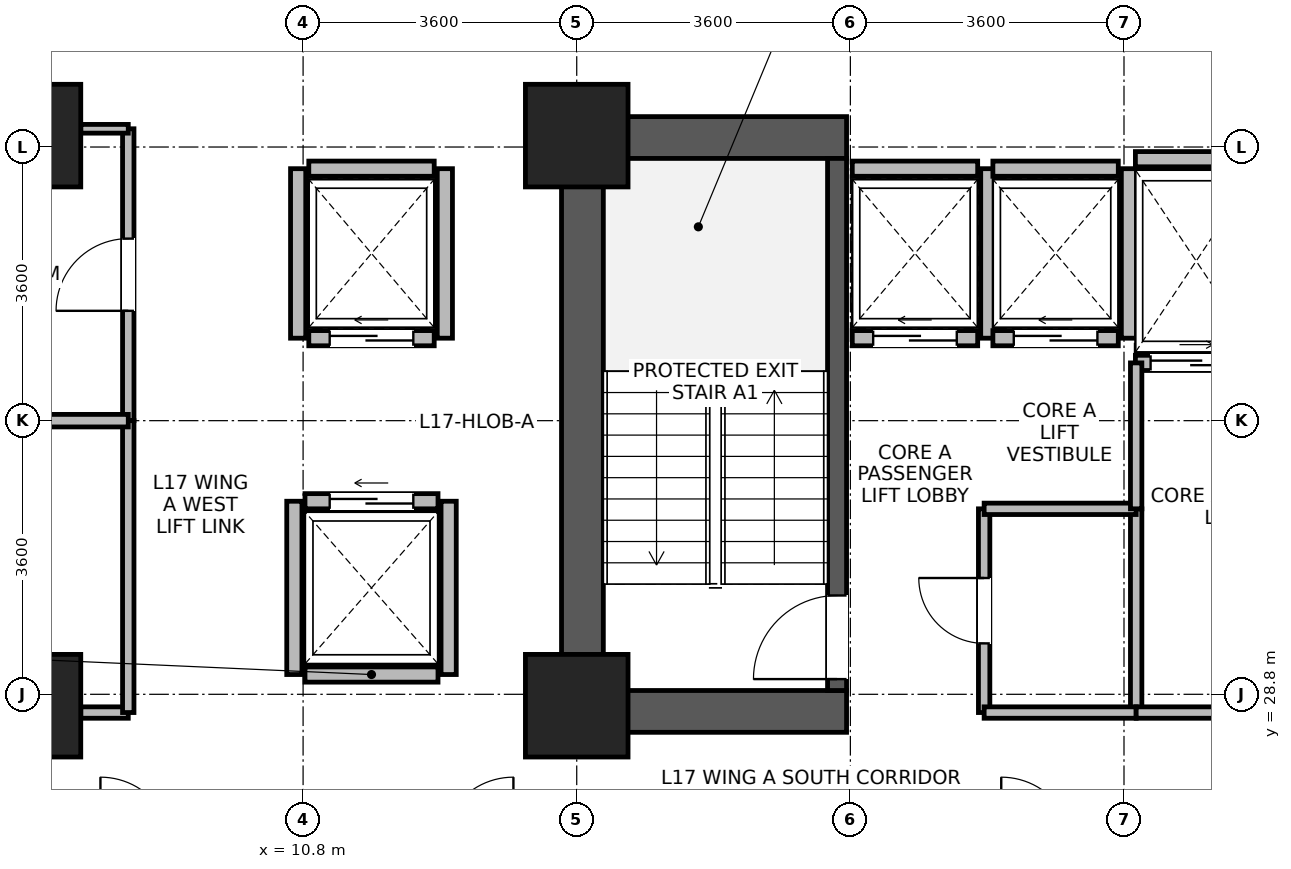
"""IFC4 building model, lengths in metres.
Left out: names, types, materials, properties, quantities, classifications, styles, units other than length and angle.
Written with IfcOpenShell. Run it as: python <this file> out.ifc"""

import sys

from ifc_helpers import new_model, si_unit, direction, frame, frame_2d, origin, origin_2d, place, context, subcontext, project, spatial, rectangle, extrude, source, transform, mapped, element, fill, save


model = new_model("IFC4")
c1 = context("Model", 3, precision=1e-05, world=origin(), true_north=direction((0.0, 1.0)))
c2 = subcontext(c1, "Body", "Model", "MODEL_VIEW")
j1 = project(units=[si_unit("LENGTHUNIT", "METRE"), si_unit("PLANEANGLEUNIT", "RADIAN")], contexts=[c1])
p1 = place(None, origin())
s1 = spatial("IfcSite", under=j1, at=p1, CompositionType="ELEMENT")
p2 = place(p1, origin())
s2 = spatial("IfcBuilding", under=s1, at=p2, CompositionType="ELEMENT")
p3 = place(p2, frame((0.0, 0.0, 69.7)))
s3 = spatial("IfcBuildingStorey", under=s2, at=p3, CompositionType="ELEMENT", Elevation=69.7)
p4 = place(p3, frame((14.475, 28.3, 0.0), z_axis=(0.0, 0.0, 1.0), x_axis=(0.0, 1.0, 0.0)))
e1 = element("IfcWall", 1, at=p4, inside=s3, PredefinedType="SHEAR", context=c2, shape_type="SweptSolid", body=[
    extrude(rectangle(XDim=8.1, YDim=0.55, at=frame_2d((4.05, 0.0))), origin(), (0.0, 0.0, 1.0), 3.34),
])
for number, where, z_axis, x_axis in (
    (2, (14.75, 28.575, 0.0), (0.0, 0.0, 1.0), (1.0, 0.0, 0.0)),
    (3, (14.75, 36.125, 0.0), (0.0, 0.0, 1.0), (1.0, 0.0, 0.0)),
):
    element("IfcWall", number, at=place(p3, frame(where, z_axis=z_axis, x_axis=x_axis)), inside=s3, PredefinedType="SHEAR", context=c2, shape_type="SweptSolid", body=[
        extrude(rectangle(XDim=3.2, YDim=0.55, at=frame_2d((1.6, 0.0))), origin(), (0.0, 0.0, 1.0), 3.34),
    ])
p5 = place(p3, frame((17.825, 28.85, 0.0), z_axis=(0.0, 0.0, 1.0), x_axis=(0.0, 1.0, 0.0)))
e4 = element("IfcWall", 4, at=p5, inside=s3, PredefinedType="SHEAR", context=c2, shape_type="SweptSolid", body=[
    extrude(rectangle(XDim=7.0, YDim=0.25, at=frame_2d((3.5, 0.0))), origin(), (0.0, 0.0, 1.0), 3.34),
])
p6 = place(p5, frame((0.15, 0.0, 0.0)))
e5 = element("IfcOpeningElement", 5, at=p6, cuts=e4, PredefinedType="OPENING", context=c2, shape_type="SweptSolid", body=[
    extrude(rectangle(XDim=1.1, YDim=2.08, at=frame_2d((0.55, 1.04))), frame((0.0, 0.135, 0.0), z_axis=(0.0, -1.0, 0.0), x_axis=(1.0, 0.0, 0.0)), (0.0, 0.0, 1.0), 0.27),
])
m1 = source(origin(), c2, "Body", "SweptSolid", [
    extrude(rectangle(XDim=1.35, YDim=1.35, at=origin_2d()), origin(), (0.0, 0.0, 1.0), 3.7),
])
for number, where, z_axis, x_axis in (
    (6, (7.2, 28.65, 0.0), (0.0, 0.0, 1.0), (1.0, 0.0, 0.0)),
    (7, (7.2, 36.15, 0.0), (0.0, 0.0, 1.0), (1.0, 0.0, 0.0)),
    (8, (14.4, 28.65, 0.0), (0.0, 0.0, 1.0), (1.0, 0.0, 0.0)),
    (9, (14.4, 36.15, 0.0), (0.0, 0.0, 1.0), (1.0, 0.0, 0.0)),
):
    element("IfcColumn", number, at=place(p3, frame(where, z_axis=z_axis, x_axis=x_axis)), inside=s3, PredefinedType="COLUMN", context=c2, shape_type="MappedRepresentation", body=[
        mapped(m1, transform((0.0, 0.0, 0.0), x_axis=(1.0, 0.0, 0.0), y_axis=(0.0, 1.0, 0.0), z_axis=(0.0, 0.0, 1.0), scale=1.0)),
    ])
p7 = place(p3, frame((18.025, 33.485, 0.0), z_axis=(0.0, 0.0, 1.0), x_axis=(1.0, 0.0, 0.0)))
e10 = element("IfcWall", 10, at=p7, inside=s3, PredefinedType="PARTITIONING", context=c2, shape_type="SweptSolid", body=[
    extrude(rectangle(XDim=1.65, YDim=0.2, at=frame_2d((0.825, 0.0))), origin(), (0.0, 0.0, 1.0), 3.32),
])
p8 = place(p7, frame((0.275, 0.0, 0.0)))
e11 = element("IfcOpeningElement", 11, at=p8, cuts=e10, PredefinedType="OPENING", context=c2, shape_type="SweptSolid", body=[
    extrude(rectangle(XDim=1.1, YDim=2.12, at=frame_2d((0.55, 1.06))), frame((0.0, 0.11, 0.0), z_axis=(0.0, -1.0, 0.0), x_axis=(1.0, 0.0, 0.0)), (0.0, 0.0, 1.0), 0.22),
])
p9 = place(p3, frame((18.025, 35.715, 0.0), z_axis=(0.0, 0.0, 1.0), x_axis=(1.0, 0.0, 0.0)))
e12 = element("IfcWall", 12, at=p9, inside=s3, PredefinedType="PARTITIONING", context=c2, shape_type="SweptSolid", body=[
    extrude(rectangle(XDim=1.65, YDim=0.2, at=frame_2d((0.825, 0.0))), origin(), (0.0, 0.0, 1.0), 2.12),
])
p10 = place(p3, frame((19.815, 33.485, 0.0), z_axis=(0.0, 0.0, 1.0), x_axis=(0.0, 1.0, 0.0)))
e13 = element("IfcWall", 13, at=p10, inside=s3, PredefinedType="PARTITIONING", context=c2, shape_type="SweptSolid", body=[
    extrude(rectangle(XDim=2.23, YDim=0.2, at=frame_2d((1.115, 0.0))), origin(), (0.0, 0.0, 1.0), 3.32),
])
p11 = place(p3, frame((19.875, 33.485, 0.0), z_axis=(0.0, 0.0, 1.0), x_axis=(1.0, 0.0, 0.0)))
e14 = element("IfcWall", 14, at=p11, inside=s3, PredefinedType="PARTITIONING", context=c2, shape_type="SweptSolid", body=[
    extrude(rectangle(XDim=1.65, YDim=0.2, at=frame_2d((0.825, 0.0))), origin(), (0.0, 0.0, 1.0), 3.32),
])
p12 = place(p11, frame((0.275, 0.0, 0.0)))
e15 = element("IfcOpeningElement", 15, at=p12, cuts=e14, PredefinedType="OPENING", context=c2, shape_type="SweptSolid", body=[
    extrude(rectangle(XDim=1.1, YDim=2.12, at=frame_2d((0.55, 1.06))), frame((0.0, 0.11, 0.0), z_axis=(0.0, -1.0, 0.0), x_axis=(1.0, 0.0, 0.0)), (0.0, 0.0, 1.0), 0.22),
])
p13 = place(p3, frame((19.875, 35.715, 0.0), z_axis=(0.0, 0.0, 1.0), x_axis=(1.0, 0.0, 0.0)))
e16 = element("IfcWall", 16, at=p13, inside=s3, PredefinedType="PARTITIONING", context=c2, shape_type="SweptSolid", body=[
    extrude(rectangle(XDim=1.65, YDim=0.2, at=frame_2d((0.825, 0.0))), origin(), (0.0, 0.0, 1.0), 2.12),
])
p14 = place(p3, frame((21.665, 33.485, 0.0), z_axis=(0.0, 0.0, 1.0), x_axis=(0.0, 1.0, 0.0)))
e17 = element("IfcWall", 17, at=p14, inside=s3, PredefinedType="PARTITIONING", context=c2, shape_type="SweptSolid", body=[
    extrude(rectangle(XDim=2.23, YDim=0.2, at=frame_2d((1.115, 0.0))), origin(), (0.0, 0.0, 1.0), 3.32),
])
p15 = place(p3, frame((10.825, 29.06, 0.0), z_axis=(0.0, 0.0, 1.0), x_axis=(1.0, 0.0, 0.0)))
e18 = element("IfcWall", 18, at=p15, inside=s3, PredefinedType="PARTITIONING", context=c2, shape_type="SweptSolid", body=[
    extrude(rectangle(XDim=1.75, YDim=0.2, at=frame_2d((0.875, 0.0))), origin(), (0.0, 0.0, 1.0), 3.32),
])
p16 = place(p3, frame((10.825, 31.34, 0.0), z_axis=(0.0, 0.0, 1.0), x_axis=(1.0, 0.0, 0.0)))
e19 = element("IfcWall", 19, at=p16, inside=s3, PredefinedType="PARTITIONING", context=c2, shape_type="SweptSolid", body=[
    extrude(rectangle(XDim=1.75, YDim=0.2, at=frame_2d((0.875, 0.0))), origin(), (0.0, 0.0, 1.0), 3.32),
])
p17 = place(p16, frame((0.325, 0.0, 0.0)))
e20 = element("IfcOpeningElement", 20, at=p17, cuts=e19, PredefinedType="OPENING", context=c2, shape_type="SweptSolid", body=[
    extrude(rectangle(XDim=1.1, YDim=2.12, at=frame_2d((0.55, 1.06))), frame((0.0, 0.11, 0.0), z_axis=(0.0, -1.0, 0.0), x_axis=(1.0, 0.0, 0.0)), (0.0, 0.0, 1.0), 0.22),
])
for number, where, z_axis, x_axis in (
    (21, (10.685, 29.06, 0.0), (0.0, 0.0, 1.0), (0.0, 1.0, 0.0)),
    (22, (12.715, 29.06, 0.0), (0.0, 0.0, 1.0), (0.0, 1.0, 0.0)),
):
    element("IfcWall", number, at=place(p3, frame(where, z_axis=z_axis, x_axis=x_axis)), inside=s3, PredefinedType="PARTITIONING", context=c2, shape_type="SweptSolid", body=[
        extrude(rectangle(XDim=2.28, YDim=0.2, at=frame_2d((1.14, 0.0))), origin(), (0.0, 0.0, 1.0), 3.32),
    ])
p18 = place(p3, frame((10.875, 33.485, 0.0), z_axis=(0.0, 0.0, 1.0), x_axis=(1.0, 0.0, 0.0)))
e23 = element("IfcWall", 23, at=p18, inside=s3, PredefinedType="PARTITIONING", context=c2, shape_type="SweptSolid", body=[
    extrude(rectangle(XDim=1.65, YDim=0.2, at=frame_2d((0.825, 0.0))), origin(), (0.0, 0.0, 1.0), 3.32),
])
p19 = place(p18, frame((0.275, 0.0, 0.0)))
e24 = element("IfcOpeningElement", 24, at=p19, cuts=e23, PredefinedType="OPENING", context=c2, shape_type="SweptSolid", body=[
    extrude(rectangle(XDim=1.1, YDim=2.12, at=frame_2d((0.55, 1.06))), frame((0.0, 0.11, 0.0), z_axis=(0.0, -1.0, 0.0), x_axis=(1.0, 0.0, 0.0)), (0.0, 0.0, 1.0), 0.22),
])
p20 = place(p3, frame((10.875, 35.715, 0.0), z_axis=(0.0, 0.0, 1.0), x_axis=(1.0, 0.0, 0.0)))
e25 = element("IfcWall", 25, at=p20, inside=s3, PredefinedType="PARTITIONING", context=c2, shape_type="SweptSolid", body=[
    extrude(rectangle(XDim=1.65, YDim=0.2, at=frame_2d((0.825, 0.0))), origin(), (0.0, 0.0, 1.0), 3.32),
])
for number, where, z_axis, x_axis in (
    (26, (10.735, 33.485, 0.0), (0.0, 0.0, 1.0), (0.0, 1.0, 0.0)),
    (27, (12.665, 33.485, 0.0), (0.0, 0.0, 1.0), (0.0, 1.0, 0.0)),
):
    element("IfcWall", number, at=place(p3, frame(where, z_axis=z_axis, x_axis=x_axis)), inside=s3, PredefinedType="PARTITIONING", context=c2, shape_type="SweptSolid", body=[
        extrude(rectangle(XDim=2.23, YDim=0.2, at=frame_2d((1.115, 0.0))), origin(), (0.0, 0.0, 1.0), 3.32),
    ])
p21 = place(p3, frame((21.75, 33.16, 0.0), z_axis=(0.0, 0.0, 1.0), x_axis=(1.0, 0.0, 0.0)))
e28 = element("IfcWall", 28, at=p21, inside=s3, PredefinedType="PARTITIONING", context=c2, shape_type="SweptSolid", body=[
    extrude(rectangle(XDim=1.6, YDim=0.2, at=frame_2d((0.8, 0.0))), origin(), (0.0, 0.0, 1.0), 3.32),
])
p22 = place(p21, frame((0.2, 0.0, 0.0)))
e29 = element("IfcOpeningElement", 29, at=p22, cuts=e28, PredefinedType="OPENING", context=c2, shape_type="SweptSolid", body=[
    extrude(rectangle(XDim=1.2, YDim=2.12, at=frame_2d((0.6, 1.06))), frame((0.0, 0.11, 0.0), z_axis=(0.0, -1.0, 0.0), x_axis=(1.0, 0.0, 0.0)), (0.0, 0.0, 1.0), 0.22),
])
p23 = place(p3, frame((21.75, 35.84, 0.0), z_axis=(0.0, 0.0, 1.0), x_axis=(1.0, 0.0, 0.0)))
e30 = element("IfcWall", 30, at=p23, inside=s3, PredefinedType="PARTITIONING", context=c2, shape_type="SweptSolid", body=[
    extrude(rectangle(XDim=1.6, YDim=0.2, at=frame_2d((0.8, 0.0))), origin(), (0.0, 0.0, 1.0), 2.12),
])
p24 = place(p3, frame((7.875, 28.56, 0.0), z_axis=(0.0, 0.0, 1.0), x_axis=(1.0, 0.0, 0.0)))
e31 = element("IfcWall", 31, at=p24, inside=s3, PredefinedType="PARTITIONING", context=c2, shape_type="SweptSolid", body=[
    extrude(rectangle(XDim=0.625, YDim=0.15, at=frame_2d((0.312, 0.0))), origin(), (0.0, 0.0, 1.0), 2.67),
])
p25 = place(p3, frame((8.5, 32.4, 0.0), z_axis=(0.0, 0.0, 1.0), x_axis=(0.0, 1.0, 0.0)))
e32 = element("IfcWall", 32, at=p25, inside=s3, PredefinedType="PARTITIONING", context=c2, shape_type="SweptSolid", body=[
    extrude(rectangle(XDim=3.84, YDim=0.15, at=frame_2d((1.92, 0.0))), origin(), (0.0, 0.0, 1.0), 3.32),
])
p26 = place(p25, frame((1.445, 0.0, 0.0)))
e33 = element("IfcOpeningElement", 33, at=p26, cuts=e32, PredefinedType="OPENING", context=c2, shape_type="SweptSolid", body=[
    extrude(rectangle(XDim=0.95, YDim=2.1, at=frame_2d((0.475, 1.05))), frame((0.0, 0.085, 0.0), z_axis=(0.0, -1.0, 0.0), x_axis=(1.0, 0.0, 0.0)), (0.0, 0.0, 1.0), 0.17),
])
p27 = place(p3, frame((8.5, 28.56, 0.0), z_axis=(0.0, 0.0, 1.0), x_axis=(0.0, 1.0, 0.0)))
e34 = element("IfcWall", 34, at=p27, inside=s3, PredefinedType="PARTITIONING", context=c2, shape_type="SweptSolid", body=[
    extrude(rectangle(XDim=3.84, YDim=0.15, at=frame_2d((1.92, 0.0))), origin(), (0.0, 0.0, 1.0), 3.32),
])
p28 = place(p3, frame((19.76, 28.56, 0.0), z_axis=(0.0, 0.0, 1.0), x_axis=(0.0, 1.0, 0.0)))
e35 = element("IfcWall", 35, at=p28, inside=s3, PredefinedType="PARTITIONING", context=c2, shape_type="SweptSolid", body=[
    extrude(rectangle(XDim=2.68, YDim=0.15, at=frame_2d((1.34, 0.0))), origin(), (0.0, 0.0, 1.0), 3.32),
])
p29 = place(p28, frame((0.91, 0.0, 0.0)))
e36 = element("IfcOpeningElement", 36, at=p29, cuts=e35, PredefinedType="OPENING", context=c2, shape_type="SweptSolid", body=[
    extrude(rectangle(XDim=0.86, YDim=2.02, at=frame_2d((0.43, 1.01))), frame((0.0, 0.085, 0.0), z_axis=(0.0, -1.0, 0.0), x_axis=(1.0, 0.0, 0.0)), (0.0, 0.0, 1.0), 0.17),
])
p30 = place(p3, frame((21.76, 28.56, 0.0), z_axis=(0.0, 0.0, 1.0), x_axis=(0.0, 1.0, 0.0)))
e37 = element("IfcWall", 37, at=p30, inside=s3, PredefinedType="PARTITIONING", context=c2, shape_type="SweptSolid", body=[
    extrude(rectangle(XDim=2.68, YDim=0.15, at=frame_2d((1.34, 0.0))), origin(), (0.0, 0.0, 1.0), 3.32),
])
p31 = place(p3, frame((19.76, 28.56, 0.0), z_axis=(0.0, 0.0, 1.0), x_axis=(1.0, 0.0, 0.0)))
e38 = element("IfcWall", 38, at=p31, inside=s3, PredefinedType="PARTITIONING", context=c2, shape_type="SweptSolid", body=[
    extrude(rectangle(XDim=2.0, YDim=0.15, at=frame_2d((1.0, 0.0))), origin(), (0.0, 0.0, 1.0), 2.12),
])
p32 = place(p3, frame((19.76, 31.24, 0.0), z_axis=(0.0, 0.0, 1.0), x_axis=(1.0, 0.0, 0.0)))
e39 = element("IfcWall", 39, at=p32, inside=s3, PredefinedType="PARTITIONING", context=c2, shape_type="SweptSolid", body=[
    extrude(rectangle(XDim=2.0, YDim=0.15, at=frame_2d((1.0, 0.0))), origin(), (0.0, 0.0, 1.0), 3.32),
])
p33 = place(p3, frame((3.732, 32.4, 0.0), z_axis=(0.0, 0.0, 1.0), x_axis=(1.0, 0.0, 0.0)))
e40 = element("IfcWall", 40, at=p33, inside=s3, PredefinedType="PARTITIONING", context=c2, shape_type="SweptSolid", body=[
    extrude(rectangle(XDim=4.768, YDim=0.165, at=frame_2d((2.384, 0.0))), origin(), (0.0, 0.0, 1.0), 3.32),
])
p34 = place(p3, frame((7.875, 36.24, 0.0), z_axis=(0.0, 0.0, 1.0), x_axis=(1.0, 0.0, 0.0)))
e41 = element("IfcWall", 41, at=p34, inside=s3, PredefinedType="PARTITIONING", context=c2, shape_type="SweptSolid", body=[
    extrude(rectangle(XDim=0.625, YDim=0.115, at=frame_2d((0.312, 0.0))), origin(), (0.0, 0.0, 1.0), 2.67),
])
p35 = place(p3, frame((21.76, 28.56, 0.0), z_axis=(0.0, 0.0, 1.0), x_axis=(1.0, 0.0, 0.0)))
e42 = element("IfcWall", 42, at=p35, inside=s3, PredefinedType="PARTITIONING", context=c2, shape_type="SweptSolid", body=[
    extrude(rectangle(XDim=3.48, YDim=0.15, at=frame_2d((1.74, 0.0))), origin(), (0.0, 0.0, 1.0), 2.12),
])
p36 = place(p35, frame((1.19, 0.0, 0.0)))
e43 = element("IfcOpeningElement", 43, at=p36, cuts=e42, PredefinedType="OPENING", context=c2, shape_type="SweptSolid", body=[
    extrude(rectangle(XDim=1.1, YDim=2.08, at=frame_2d((0.55, 1.04))), frame((0.0, 0.085, 0.0), z_axis=(0.0, -1.0, 0.0), x_axis=(1.0, 0.0, 0.0)), (0.0, 0.0, 1.0), 0.17),
])
p37 = place(p3, frame((21.76, 31.24, 0.0), z_axis=(0.0, 0.0, 1.0), x_axis=(0.0, 1.0, 0.0)))
e44 = element("IfcWall", 44, at=p37, inside=s3, PredefinedType="PARTITIONING", context=c2, shape_type="SweptSolid", body=[
    extrude(rectangle(XDim=1.92, YDim=0.15, at=frame_2d((0.96, 0.0))), origin(), (0.0, 0.0, 1.0), 3.32),
])
p38 = place(p6, origin())
e45 = element("IfcDoor", 45, at=p38, inside=s3, OperationType="SINGLE_SWING_LEFT", PredefinedType="DOOR", context=c2, shape_type="SweptSolid", body=[
    extrude(rectangle(XDim=1.1, YDim=2.08, at=frame_2d((0.55, 1.04))), frame((0.0, 0.025, 0.0), z_axis=(0.0, -1.0, 0.0), x_axis=(1.0, 0.0, 0.0)), (0.0, 0.0, 1.0), 0.05),
])
fill(e5, e45)
p39 = place(p8, origin())
e46 = element("IfcDoor", 46, at=p39, inside=s3, OperationType="SLIDING_TO_LEFT", PredefinedType="DOOR", context=c2, shape_type="SweptSolid", body=[
    extrude(rectangle(XDim=1.1, YDim=2.12, at=frame_2d((0.55, 1.06))), frame((0.0, 0.025, 0.0), z_axis=(0.0, -1.0, 0.0), x_axis=(1.0, 0.0, 0.0)), (0.0, 0.0, 1.0), 0.05),
])
fill(e11, e46)
p40 = place(p12, origin())
e47 = element("IfcDoor", 47, at=p40, inside=s3, OperationType="SLIDING_TO_LEFT", PredefinedType="DOOR", context=c2, shape_type="SweptSolid", body=[
    extrude(rectangle(XDim=1.1, YDim=2.12, at=frame_2d((0.55, 1.06))), frame((0.0, 0.025, 0.0), z_axis=(0.0, -1.0, 0.0), x_axis=(1.0, 0.0, 0.0)), (0.0, 0.0, 1.0), 0.05),
])
fill(e15, e47)
p41 = place(p17, origin())
e48 = element("IfcDoor", 48, at=p41, inside=s3, OperationType="SLIDING_TO_LEFT", PredefinedType="DOOR", context=c2, shape_type="SweptSolid", body=[
    extrude(rectangle(XDim=1.1, YDim=2.12, at=frame_2d((0.55, 1.06))), frame((0.0, 0.025, 0.0), z_axis=(0.0, -1.0, 0.0), x_axis=(1.0, 0.0, 0.0)), (0.0, 0.0, 1.0), 0.05),
])
fill(e20, e48)
p42 = place(p19, origin())
e49 = element("IfcDoor", 49, at=p42, inside=s3, OperationType="SLIDING_TO_LEFT", PredefinedType="DOOR", context=c2, shape_type="SweptSolid", body=[
    extrude(rectangle(XDim=1.1, YDim=2.12, at=frame_2d((0.55, 1.06))), frame((0.0, 0.025, 0.0), z_axis=(0.0, -1.0, 0.0), x_axis=(1.0, 0.0, 0.0)), (0.0, 0.0, 1.0), 0.05),
])
fill(e24, e49)
p43 = place(p22, origin())
e50 = element("IfcDoor", 50, at=p43, inside=s3, OperationType="SLIDING_TO_RIGHT", PredefinedType="DOOR", context=c2, shape_type="SweptSolid", body=[
    extrude(rectangle(XDim=1.2, YDim=2.12, at=frame_2d((0.6, 1.06))), frame((0.0, 0.025, 0.0), z_axis=(0.0, -1.0, 0.0), x_axis=(1.0, 0.0, 0.0)), (0.0, 0.0, 1.0), 0.05),
])
fill(e29, e50)
p44 = place(p26, origin())
e51 = element("IfcDoor", 51, at=p44, inside=s3, OperationType="SINGLE_SWING_LEFT", PredefinedType="DOOR", context=c2, shape_type="SweptSolid", body=[
    extrude(rectangle(XDim=0.95, YDim=2.1, at=frame_2d((0.475, 1.05))), frame((0.0, 0.025, 0.0), z_axis=(0.0, -1.0, 0.0), x_axis=(1.0, 0.0, 0.0)), (0.0, 0.0, 1.0), 0.05),
])
fill(e33, e51)
p45 = place(p29, origin())
e52 = element("IfcDoor", 52, at=p45, inside=s3, OperationType="SINGLE_SWING_RIGHT", PredefinedType="DOOR", context=c2, shape_type="SweptSolid", body=[
    extrude(rectangle(XDim=0.86, YDim=2.02, at=frame_2d((0.43, 1.01))), frame((0.0, 0.025, 0.0), z_axis=(0.0, -1.0, 0.0), x_axis=(1.0, 0.0, 0.0)), (0.0, 0.0, 1.0), 0.05),
])
fill(e36, e52)
save(model, sys.argv[1])
